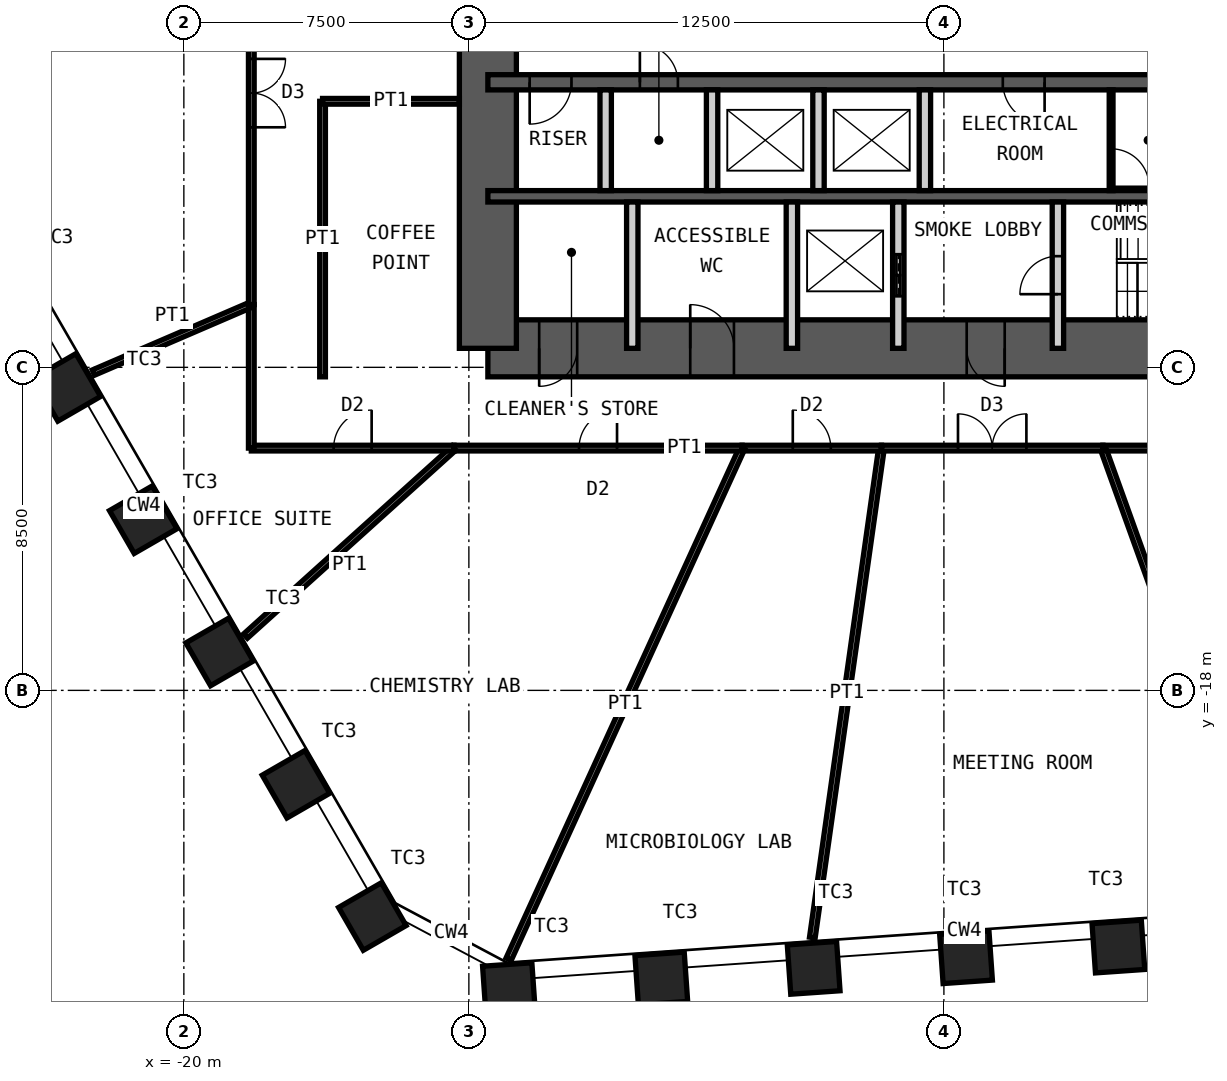
"""IFC4 building model, lengths in metres.
Left out: names, types, materials, properties, quantities, classifications, styles, units other than length and angle.
Written with IfcOpenShell. Run it as: python <this file> out.ifc"""

import sys

from ifc_helpers import new_model, si_unit, direction, frame, frame_2d, origin, origin_2d, place, context, subcontext, project, spatial, rectangle, hollow_rectangle, extrude, element, fill, save


model = new_model("IFC4")
c1 = context("Model", 3, precision=1e-05, world=origin(), true_north=direction((0.0, 1.0)))
c2 = subcontext(c1, "Body", "Model", "MODEL_VIEW")
j1 = project(units=[si_unit("LENGTHUNIT", "METRE"), si_unit("PLANEANGLEUNIT", "RADIAN")], contexts=[c1])
p1 = place(None, origin())
s1 = spatial("IfcSite", under=j1, at=p1, CompositionType="ELEMENT")
p2 = place(p1, origin())
s2 = spatial("IfcBuilding", under=s1, at=p2, CompositionType="ELEMENT")
p3 = place(p2, frame((0.0, 0.0, 128.2)))
s3 = spatial("IfcBuildingStorey", under=s2, at=p3, CompositionType="ELEMENT", Elevation=128.2)
for number, where, z_axis, x_axis in (
    (1, (4.592, -24.74, 0.0), (0.0, 0.0, 1.0), (0.998, 0.07, 0.0)),
    (2, (0.582, -25.02, 0.0), (0.0, 0.0, 1.0), (0.998, 0.07, 0.0)),
    (3, (-3.427, -25.301, 0.0), (0.0, 0.0, 1.0), (0.998, 0.07, 0.0)),
    (4, (-7.436, -25.581, 0.0), (0.0, 0.0, 1.0), (0.998, 0.07, 0.0)),
    (5, (-11.446, -25.861, 0.0), (0.0, 0.0, 1.0), (0.998, 0.07, 0.0)),
    (6, (-15.04, -23.95, 0.0), (0.0, 0.0, 1.0), (0.5, -0.866, 0.0)),
    (7, (-17.049, -20.47, 0.0), (0.0, 0.0, 1.0), (0.5, -0.866, 0.0)),
    (8, (-19.059, -16.989, 0.0), (0.0, 0.0, 1.0), (0.5, -0.866, 0.0)),
    (9, (-21.068, -13.509, 0.0), (0.0, 0.0, 1.0), (0.5, -0.866, 0.0)),
    (10, (-23.078, -10.028, 0.0), (0.0, 0.0, 1.0), (0.5, -0.866, 0.0)),
):
    element("IfcColumn", number, at=place(p3, frame(where, z_axis=z_axis, x_axis=x_axis)), inside=s3, PredefinedType="COLUMN", context=c2, shape_type="SweptSolid", body=[
        extrude(hollow_rectangle(XDim=1.3, YDim=1.3, WallThickness=0.1, at=origin_2d()), origin(), (0.0, 0.0, 1.0), 4.2),
    ])
p4 = place(p3, frame((-12.0, -9.0, 0.0), z_axis=(0.0, 0.0, 1.0), x_axis=(1.0, 0.0, 0.0)))
e11 = element("IfcWall", 11, at=p4, inside=s3, PredefinedType="SHEAR", context=c2, shape_type="SweptSolid", body=[
    extrude(rectangle(XDim=24.0, YDim=1.5, at=frame_2d((12.0, 0.0))), origin(), (0.0, 0.0, 1.0), 4.2),
])
p5 = place(p4, frame((1.35, 0.0, 0.0)))
e12 = element("IfcOpeningElement", 12, at=p5, cuts=e11, PredefinedType="OPENING", context=c2, shape_type="SweptSolid", body=[
    extrude(rectangle(XDim=1.0, YDim=2.1, at=frame_2d((0.5, 1.05))), frame((0.0, 0.76, 0.0), z_axis=(0.0, -1.0, 0.0), x_axis=(1.0, 0.0, 0.0)), (0.0, 0.0, 1.0), 1.52),
])
p6 = place(p4, frame((5.325, 0.0, 0.0)))
e13 = element("IfcOpeningElement", 13, at=p6, cuts=e11, PredefinedType="OPENING", context=c2, shape_type="SweptSolid", body=[
    extrude(rectangle(XDim=1.15, YDim=2.1, at=frame_2d((0.575, 1.05))), frame((0.0, 0.76, 0.0), z_axis=(0.0, -1.0, 0.0), x_axis=(1.0, 0.0, 0.0)), (0.0, 0.0, 1.0), 1.52),
])
p7 = place(p4, frame((12.6, 0.0, 0.0)))
e14 = element("IfcOpeningElement", 14, at=p7, cuts=e11, PredefinedType="OPENING", context=c2, shape_type="SweptSolid", body=[
    extrude(rectangle(XDim=1.0, YDim=2.1, at=frame_2d((0.5, 1.05))), frame((0.0, 0.76, 0.0), z_axis=(0.0, -1.0, 0.0), x_axis=(1.0, 0.0, 0.0)), (0.0, 0.0, 1.0), 1.52),
])
p8 = place(p3, frame((-12.0, -9.0, 0.0), z_axis=(0.0, 0.0, 1.0), x_axis=(0.0, 1.0, 0.0)))
e15 = element("IfcWall", 15, at=p8, inside=s3, PredefinedType="SHEAR", context=c2, shape_type="SweptSolid", body=[
    extrude(rectangle(XDim=18.0, YDim=1.5, at=frame_2d((9.0, 0.0))), origin(), (0.0, 0.0, 1.0), 4.2),
])
p9 = place(p8, frame((8.1, 0.0, 0.0)))
e16 = element("IfcOpeningElement", 16, at=p9, cuts=e15, PredefinedType="OPENING", context=c2, shape_type="SweptSolid", body=[
    extrude(rectangle(XDim=1.8, YDim=2.1, at=frame_2d((0.9, 1.05))), frame((0.0, 0.76, 0.0), z_axis=(0.0, -1.0, 0.0), x_axis=(1.0, 0.0, 0.0)), (0.0, 0.0, 1.0), 1.52),
])
p10 = place(p3, frame((-12.0, -2.0, 0.0), z_axis=(0.0, 0.0, 1.0), x_axis=(1.0, 0.0, 0.0)))
e17 = element("IfcWall", 17, at=p10, inside=s3, PredefinedType="SHEAR", context=c2, shape_type="SweptSolid", body=[
    extrude(rectangle(XDim=24.0, YDim=0.4, at=frame_2d((12.0, 0.0))), origin(), (0.0, 0.0, 1.0), 4.2),
])
p11 = place(p10, frame((1.1, 0.0, 0.0)))
e18 = element("IfcOpeningElement", 18, at=p11, cuts=e17, PredefinedType="OPENING", context=c2, shape_type="SweptSolid", body=[
    extrude(rectangle(XDim=1.1, YDim=2.1, at=frame_2d((0.55, 1.05))), frame((0.0, 0.21, 0.0), z_axis=(0.0, -1.0, 0.0), x_axis=(1.0, 0.0, 0.0)), (0.0, 0.0, 1.0), 0.42),
])
p12 = place(p10, frame((13.55, 0.0, 0.0)))
e19 = element("IfcOpeningElement", 19, at=p12, cuts=e17, PredefinedType="OPENING", context=c2, shape_type="SweptSolid", body=[
    extrude(rectangle(XDim=1.1, YDim=2.1, at=frame_2d((0.55, 1.05))), frame((0.0, 0.21, 0.0), z_axis=(0.0, -1.0, 0.0), x_axis=(1.0, 0.0, 0.0)), (0.0, 0.0, 1.0), 0.42),
])
p13 = place(p10, frame((20.7, 0.0, 0.0)))
e20 = element("IfcOpeningElement", 20, at=p13, cuts=e17, PredefinedType="OPENING", context=c2, shape_type="SweptSolid", body=[
    extrude(rectangle(XDim=1.1, YDim=2.1, at=frame_2d((0.55, 1.05))), frame((0.0, 0.21, 0.0), z_axis=(0.0, -1.0, 0.0), x_axis=(1.0, 0.0, 0.0)), (0.0, 0.0, 1.0), 0.42),
])
p14 = place(p10, frame((4.0, 0.0, 0.0)))
e21 = element("IfcOpeningElement", 21, at=p14, cuts=e17, PredefinedType="OPENING", context=c2, shape_type="SweptSolid", body=[
    extrude(rectangle(XDim=1.0, YDim=2.1, at=frame_2d((0.5, 1.05))), frame((0.0, 0.21, 0.0), z_axis=(0.0, -1.0, 0.0), x_axis=(1.0, 0.0, 0.0)), (0.0, 0.0, 1.0), 0.42),
])
p15 = place(p3, frame((-12.0, -5.0, 0.0), z_axis=(0.0, 0.0, 1.0), x_axis=(1.0, 0.0, 0.0)))
e22 = element("IfcWall", 22, at=p15, inside=s3, PredefinedType="SHEAR", context=c2, shape_type="SweptSolid", body=[
    extrude(rectangle(XDim=24.0, YDim=0.3, at=frame_2d((12.0, 0.0))), origin(), (0.0, 0.0, 1.0), 4.2),
])
for number, where, z_axis, x_axis in (
    (23, (-8.9, -4.85, 0.0), (0.0, 0.0, 1.0), (0.0, 1.0, 0.0)),
    (24, (-6.1, -4.85, 0.0), (0.0, 0.0, 1.0), (0.0, 1.0, 0.0)),
    (25, (-3.3, -4.85, 0.0), (0.0, 0.0, 1.0), (0.0, 1.0, 0.0)),
    (26, (-0.5, -4.85, 0.0), (0.0, 0.0, 1.0), (0.0, 1.0, 0.0)),
):
    element("IfcWall", number, at=place(p3, frame(where, z_axis=z_axis, x_axis=x_axis)), inside=s3, PredefinedType="PARTITIONING", context=c2, shape_type="SweptSolid", body=[
        extrude(rectangle(XDim=2.65, YDim=0.3, at=frame_2d((1.325, 0.0))), origin(), (0.0, 0.0, 1.0), 3.98),
    ])
for number, where, z_axis, x_axis in (
    (27, (-8.2, -9.0, 0.0), (0.0, 0.0, 1.0), (0.0, 1.0, 0.0)),
    (28, (-4.0, -9.0, 0.0), (0.0, 0.0, 1.0), (0.0, 1.0, 0.0)),
):
    element("IfcWall", number, at=place(p3, frame(where, z_axis=z_axis, x_axis=x_axis)), inside=s3, PredefinedType="PARTITIONING", context=c2, shape_type="SweptSolid", body=[
        extrude(rectangle(XDim=3.85, YDim=0.3, at=frame_2d((1.925, 0.0))), origin(), (0.0, 0.0, 1.0), 3.98),
    ])
p16 = place(p3, frame((-1.2, -9.0, 0.0), z_axis=(0.0, 0.0, 1.0), x_axis=(0.0, 1.0, 0.0)))
e29 = element("IfcWall", 29, at=p16, inside=s3, PredefinedType="PARTITIONING", context=c2, shape_type="SweptSolid", body=[
    extrude(rectangle(XDim=3.85, YDim=0.3, at=frame_2d((1.925, 0.0))), origin(), (0.0, 0.0, 1.0), 3.98),
])
p17 = place(p16, frame((1.375, 0.0, 0.0)))
e30 = element("IfcOpeningElement", 30, at=p17, cuts=e29, PredefinedType="OPENING", context=c2, shape_type="SweptSolid", body=[
    extrude(rectangle(XDim=1.1, YDim=2.4, at=frame_2d((0.55, 1.2))), frame((0.0, 0.16, 0.0), z_axis=(0.0, -1.0, 0.0), x_axis=(1.0, 0.0, 0.0)), (0.0, 0.0, 1.0), 0.32),
])
p18 = place(p3, frame((3.0, -9.0, 0.0), z_axis=(0.0, 0.0, 1.0), x_axis=(0.0, 1.0, 0.0)))
e31 = element("IfcWall", 31, at=p18, inside=s3, PredefinedType="PARTITIONING", context=c2, shape_type="SweptSolid", body=[
    extrude(rectangle(XDim=3.85, YDim=0.3, at=frame_2d((1.925, 0.0))), origin(), (0.0, 0.0, 1.0), 3.98),
])
p19 = place(p18, frame((1.425, 0.0, 0.0)))
e32 = element("IfcOpeningElement", 32, at=p19, cuts=e31, PredefinedType="OPENING", context=c2, shape_type="SweptSolid", body=[
    extrude(rectangle(XDim=1.0, YDim=2.1, at=frame_2d((0.5, 1.05))), frame((0.0, 0.16, 0.0), z_axis=(0.0, -1.0, 0.0), x_axis=(1.0, 0.0, 0.0)), (0.0, 0.0, 1.0), 0.32),
])
p20 = place(p3, frame((4.4, -4.85, 0.0), z_axis=(0.0, 0.0, 1.0), x_axis=(0.0, 1.0, 0.0)))
e33 = element("IfcWall", 33, at=p20, inside=s3, PredefinedType="PARTITIONING", context=c2, shape_type="SweptSolid", body=[
    extrude(rectangle(XDim=2.65, YDim=0.1, at=frame_2d((1.325, 0.0))), origin(), (0.0, 0.0, 1.0), 3.98),
])
p21 = place(p20, frame((0.1, 0.0, 0.0)))
e34 = element("IfcOpeningElement", 34, at=p21, cuts=e33, PredefinedType="OPENING", context=c2, shape_type="SweptSolid", body=[
    extrude(rectangle(XDim=1.0, YDim=2.4, at=frame_2d((0.5, 1.2))), frame((0.0, 0.06, 0.0), z_axis=(0.0, -1.0, 0.0), x_axis=(1.0, 0.0, 0.0)), (0.0, 0.0, 1.0), 0.12),
])
p22 = place(p3, frame((-3.462, -24.503, 0.0), z_axis=(0.0, 0.0, 1.0), x_axis=(0.139899618934, 0.990165691499, 0.0)))
e35 = element("IfcWall", 35, at=p22, inside=s3, PredefinedType="PARTITIONING", context=c2, shape_type="SweptSolid", body=[
    extrude(rectangle(XDim=13.006, YDim=0.15, at=frame_2d((6.503, 0.0))), origin(), (0.0, 0.0, 1.0), 3.33),
])
p23 = place(p3, frame((-1.642, -11.625, 0.0), z_axis=(0.0, 0.0, 1.0), x_axis=(-1.0, 0.0, 0.0)))
e36 = element("IfcWall", 36, at=p23, inside=s3, PredefinedType="PARTITIONING", context=c2, shape_type="SweptSolid", body=[
    extrude(rectangle(XDim=3.668, YDim=0.15, at=frame_2d((1.834, 0.0))), origin(), (0.0, 0.0, 1.0), 4.03),
])
p24 = place(p23, frame((1.334, 0.0, 0.0)))
e37 = element("IfcOpeningElement", 37, at=p24, cuts=e36, PredefinedType="OPENING", context=c2, shape_type="SweptSolid", body=[
    extrude(rectangle(XDim=1.0, YDim=2.4, at=frame_2d((0.5, 1.2))), frame((0.0, 0.085, 0.0), z_axis=(0.0, -1.0, 0.0), x_axis=(1.0, 0.0, 0.0)), (0.0, 0.0, 1.0), 0.17),
])
p25 = place(p3, frame((-11.453, -25.072, 0.0), z_axis=(0.0, 0.0, 1.0), x_axis=(0.415494357555, 0.909595755729, 0.0)))
e38 = element("IfcWall", 38, at=p25, inside=s3, PredefinedType="PARTITIONING", context=c2, shape_type="SweptSolid", body=[
    extrude(rectangle(XDim=14.784, YDim=0.15, at=frame_2d((7.392, 0.0))), origin(), (0.0, 0.0, 1.0), 2.93),
])
p26 = place(p3, frame((-5.31, -11.625, 0.0), z_axis=(0.0, 0.0, 1.0), x_axis=(-1.0, 0.0, 0.0)))
e39 = element("IfcWall", 39, at=p26, inside=s3, PredefinedType="PARTITIONING", context=c2, shape_type="SweptSolid", body=[
    extrude(rectangle(XDim=7.582, YDim=0.15, at=frame_2d((3.791, 0.0))), origin(), (0.0, 0.0, 1.0), 4.03),
])
p27 = place(p26, frame((3.291, 0.0, 0.0)))
e40 = element("IfcOpeningElement", 40, at=p27, cuts=e39, PredefinedType="OPENING", context=c2, shape_type="SweptSolid", body=[
    extrude(rectangle(XDim=1.0, YDim=2.4, at=frame_2d((0.5, 1.2))), frame((0.0, 0.085, 0.0), z_axis=(0.0, -1.0, 0.0), x_axis=(1.0, 0.0, 0.0)), (0.0, 0.0, 1.0), 0.17),
])
p28 = place(p3, frame((-18.378, -16.572, 0.0), z_axis=(0.0, 0.0, 1.0), x_axis=(0.742666079924, 0.669661924951, 0.0)))
e41 = element("IfcWall", 41, at=p28, inside=s3, PredefinedType="PARTITIONING", context=c2, shape_type="SweptSolid", body=[
    extrude(rectangle(XDim=7.387, YDim=0.15, at=frame_2d((3.694, 0.0))), origin(), (0.0, 0.0, 1.0), 3.33),
])
p29 = place(p3, frame((-12.892, -11.625, 0.0), z_axis=(0.0, 0.0, 1.0), x_axis=(-1.0, 0.0, 0.0)))
e42 = element("IfcWall", 42, at=p29, inside=s3, PredefinedType="PARTITIONING", context=c2, shape_type="SweptSolid", body=[
    extrude(rectangle(XDim=5.333, YDim=0.15, at=frame_2d((2.667, 0.0))), origin(), (0.0, 0.0, 1.0), 4.03),
])
p30 = place(p29, frame((2.167, 0.0, 0.0)))
e43 = element("IfcOpeningElement", 43, at=p30, cuts=e42, PredefinedType="OPENING", context=c2, shape_type="SweptSolid", body=[
    extrude(rectangle(XDim=1.0, YDim=2.4, at=frame_2d((0.5, 1.2))), frame((0.0, 0.085, 0.0), z_axis=(0.0, -1.0, 0.0), x_axis=(1.0, 0.0, 0.0)), (0.0, 0.0, 1.0), 0.17),
])
p31 = place(p3, frame((-18.225, -11.625, 0.0), z_axis=(0.0, 0.0, 1.0), x_axis=(0.0, 1.0, 0.0)))
e44 = element("IfcWall", 44, at=p31, inside=s3, PredefinedType="PARTITIONING", context=c2, shape_type="SweptSolid", body=[
    extrude(rectangle(XDim=3.776, YDim=0.15, at=frame_2d((1.888, 0.0))), origin(), (0.0, 0.0, 1.0), 4.03),
])
p32 = place(p3, frame((-22.38, -9.638, 0.0), z_axis=(0.0, 0.0, 1.0), x_axis=(0.918428905659, 0.395586078181, 0.0)))
e45 = element("IfcWall", 45, at=p32, inside=s3, PredefinedType="PARTITIONING", context=c2, shape_type="SweptSolid", body=[
    extrude(rectangle(XDim=4.524, YDim=0.15, at=frame_2d((2.262, 0.0))), origin(), (0.0, 0.0, 1.0), 3.33),
])
p33 = place(p3, frame((-18.225, -7.849, 0.0), z_axis=(0.0, 0.0, 1.0), x_axis=(0.0, 1.0, 0.0)))
e46 = element("IfcWall", 46, at=p33, inside=s3, PredefinedType="PARTITIONING", context=c2, shape_type="SweptSolid", body=[
    extrude(rectangle(XDim=11.13, YDim=0.15, at=frame_2d((5.565, 0.0))), origin(), (0.0, 0.0, 1.0), 4.03),
])
p34 = place(p33, frame((4.665, 0.0, 0.0)))
e47 = element("IfcOpeningElement", 47, at=p34, cuts=e46, PredefinedType="OPENING", context=c2, shape_type="SweptSolid", body=[
    extrude(rectangle(XDim=1.8, YDim=2.4, at=frame_2d((0.9, 1.2))), frame((0.0, 0.085, 0.0), z_axis=(0.0, -1.0, 0.0), x_axis=(1.0, 0.0, 0.0)), (0.0, 0.0, 1.0), 0.17),
])
p35 = place(p3, frame((8.401, -11.625, 0.0), z_axis=(0.0, 0.0, 1.0), x_axis=(-1.0, 0.0, 0.0)))
e48 = element("IfcWall", 48, at=p35, inside=s3, PredefinedType="PARTITIONING", context=c2, shape_type="SweptSolid", body=[
    extrude(rectangle(XDim=4.217, YDim=0.15, at=frame_2d((2.109, 0.0))), origin(), (0.0, 0.0, 1.0), 4.03),
])
p36 = place(p35, frame((1.609, 0.0, 0.0)))
e49 = element("IfcOpeningElement", 49, at=p36, cuts=e48, PredefinedType="OPENING", context=c2, shape_type="SweptSolid", body=[
    extrude(rectangle(XDim=1.0, YDim=2.4, at=frame_2d((0.5, 1.2))), frame((0.0, 0.085, 0.0), z_axis=(0.0, -1.0, 0.0), x_axis=(1.0, 0.0, 0.0)), (0.0, 0.0, 1.0), 0.17),
])
p37 = place(p3, frame((8.518, -23.667, 0.0), z_axis=(0.0, 0.0, 1.0), x_axis=(-0.338635030469, 0.940917805198, 0.0)))
e50 = element("IfcWall", 50, at=p37, inside=s3, PredefinedType="PARTITIONING", context=c2, shape_type="SweptSolid", body=[
    extrude(rectangle(XDim=12.798, YDim=0.15, at=frame_2d((6.399, 0.0))), origin(), (0.0, 0.0, 1.0), 3.33),
])
p38 = place(p3, frame((4.184, -11.625, 0.0), z_axis=(0.0, 0.0, 1.0), x_axis=(-1.0, 0.0, 0.0)))
e51 = element("IfcWall", 51, at=p38, inside=s3, PredefinedType="PARTITIONING", context=c2, shape_type="SweptSolid", body=[
    extrude(rectangle(XDim=5.826, YDim=0.15, at=frame_2d((2.913, 0.0))), origin(), (0.0, 0.0, 1.0), 4.03),
])
p39 = place(p38, frame((2.013, 0.0, 0.0)))
e52 = element("IfcOpeningElement", 52, at=p39, cuts=e51, PredefinedType="OPENING", context=c2, shape_type="SweptSolid", body=[
    extrude(rectangle(XDim=1.8, YDim=2.4, at=frame_2d((0.9, 1.2))), frame((0.0, 0.085, 0.0), z_axis=(0.0, -1.0, 0.0), x_axis=(1.0, 0.0, 0.0)), (0.0, 0.0, 1.0), 0.17),
])
p40 = place(p3, frame((-16.35, -9.75, 0.0), z_axis=(0.0, 0.0, 1.0), x_axis=(0.0, 1.0, 0.0)))
e53 = element("IfcWall", 53, at=p40, inside=s3, PredefinedType="PARTITIONING", context=c2, shape_type="SweptSolid", body=[
    extrude(rectangle(XDim=7.25, YDim=0.15, at=frame_2d((3.625, 0.0))), origin(), (0.0, 0.0, 1.0), 4.03),
])
p41 = place(p3, frame((-12.75, -2.5, 0.0), z_axis=(0.0, 0.0, 1.0), x_axis=(-1.0, 0.0, 0.0)))
e54 = element("IfcWall", 54, at=p41, inside=s3, PredefinedType="PARTITIONING", context=c2, shape_type="SweptSolid", body=[
    extrude(rectangle(XDim=3.6, YDim=0.15, at=frame_2d((1.8, 0.0))), origin(), (0.0, 0.0, 1.0), 3.33),
])
p42 = place(p5, origin())
e55 = element("IfcDoor", 55, at=p42, inside=s3, OperationType="SINGLE_SWING_LEFT", PredefinedType="DOOR", context=c2, shape_type="SweptSolid", body=[
    extrude(rectangle(XDim=1.0, YDim=2.1, at=frame_2d((0.5, 1.05))), frame((0.0, 0.025, 0.0), z_axis=(0.0, -1.0, 0.0), x_axis=(1.0, 0.0, 0.0)), (0.0, 0.0, 1.0), 0.05),
])
fill(e12, e55)
p43 = place(p6, origin())
e56 = element("IfcDoor", 56, at=p43, inside=s3, OperationType="SINGLE_SWING_RIGHT", PredefinedType="DOOR", context=c2, shape_type="SweptSolid", body=[
    extrude(rectangle(XDim=1.15, YDim=2.1, at=frame_2d((0.575, 1.05))), frame((0.0, 0.025, 0.0), z_axis=(0.0, -1.0, 0.0), x_axis=(1.0, 0.0, 0.0)), (0.0, 0.0, 1.0), 0.05),
])
fill(e13, e56)
p44 = place(p7, origin())
e57 = element("IfcDoor", 57, at=p44, inside=s3, OperationType="SINGLE_SWING_RIGHT", PredefinedType="DOOR", context=c2, shape_type="SweptSolid", body=[
    extrude(rectangle(XDim=1.0, YDim=2.1, at=frame_2d((0.5, 1.05))), frame((0.0, 0.025, 0.0), z_axis=(0.0, -1.0, 0.0), x_axis=(1.0, 0.0, 0.0)), (0.0, 0.0, 1.0), 0.05),
])
fill(e14, e57)
p45 = place(p19, origin())
e58 = element("IfcDoor", 58, at=p45, inside=s3, OperationType="SINGLE_SWING_RIGHT", PredefinedType="DOOR", context=c2, shape_type="SweptSolid", body=[
    extrude(rectangle(XDim=1.0, YDim=2.1, at=frame_2d((0.5, 1.05))), frame((0.0, 0.025, 0.0), z_axis=(0.0, -1.0, 0.0), x_axis=(1.0, 0.0, 0.0)), (0.0, 0.0, 1.0), 0.05),
])
fill(e32, e58)
p46 = place(p11, origin())
e59 = element("IfcDoor", 59, at=p46, inside=s3, OperationType="SINGLE_SWING_LEFT", PredefinedType="DOOR", context=c2, shape_type="SweptSolid", body=[
    extrude(rectangle(XDim=1.1, YDim=2.1, at=frame_2d((0.55, 1.05))), frame((0.0, 0.025, 0.0), z_axis=(0.0, -1.0, 0.0), x_axis=(1.0, 0.0, 0.0)), (0.0, 0.0, 1.0), 0.05),
])
fill(e18, e59)
p47 = place(p12, origin())
e60 = element("IfcDoor", 60, at=p47, inside=s3, OperationType="SINGLE_SWING_RIGHT", PredefinedType="DOOR", context=c2, shape_type="SweptSolid", body=[
    extrude(rectangle(XDim=1.1, YDim=2.1, at=frame_2d((0.55, 1.05))), frame((0.0, 0.025, 0.0), z_axis=(0.0, -1.0, 0.0), x_axis=(1.0, 0.0, 0.0)), (0.0, 0.0, 1.0), 0.05),
])
fill(e19, e60)
p48 = place(p17, origin())
e61 = element("IfcDoor", 61, at=p48, inside=s3, OperationType="DOUBLE_DOOR_SLIDING", PredefinedType="DOOR", context=c2, shape_type="SweptSolid", body=[
    extrude(rectangle(XDim=1.1, YDim=2.4, at=frame_2d((0.55, 1.2))), frame((0.0, 0.025, 0.0), z_axis=(0.0, -1.0, 0.0), x_axis=(1.0, 0.0, 0.0)), (0.0, 0.0, 1.0), 0.05),
])
fill(e30, e61)
p49 = place(p14, origin())
e62 = element("IfcDoor", 62, at=p49, inside=s3, OperationType="SINGLE_SWING_RIGHT", PredefinedType="DOOR", context=c2, shape_type="SweptSolid", body=[
    extrude(rectangle(XDim=1.0, YDim=2.1, at=frame_2d((0.5, 1.05))), frame((0.0, 0.025, 0.0), z_axis=(0.0, -1.0, 0.0), x_axis=(1.0, 0.0, 0.0)), (0.0, 0.0, 1.0), 0.05),
])
fill(e21, e62)
p50 = place(p21, origin())
e63 = element("IfcDoor", 63, at=p50, inside=s3, OperationType="SINGLE_SWING_LEFT", PredefinedType="DOOR", context=c2, shape_type="SweptSolid", body=[
    extrude(rectangle(XDim=1.0, YDim=2.4, at=frame_2d((0.5, 1.2))), frame((0.0, 0.025, 0.0), z_axis=(0.0, -1.0, 0.0), x_axis=(1.0, 0.0, 0.0)), (0.0, 0.0, 1.0), 0.05),
])
fill(e34, e63)
p51 = place(p24, origin())
e64 = element("IfcDoor", 64, at=p51, inside=s3, OperationType="SINGLE_SWING_RIGHT", PredefinedType="DOOR", context=c2, shape_type="SweptSolid", body=[
    extrude(rectangle(XDim=1.0, YDim=2.4, at=frame_2d((0.5, 1.2))), frame((0.0, 0.025, 0.0), z_axis=(0.0, -1.0, 0.0), x_axis=(1.0, 0.0, 0.0)), (0.0, 0.0, 1.0), 0.05),
])
fill(e37, e64)
p52 = place(p27, origin())
e65 = element("IfcDoor", 65, at=p52, inside=s3, OperationType="SINGLE_SWING_LEFT", PredefinedType="DOOR", context=c2, shape_type="SweptSolid", body=[
    extrude(rectangle(XDim=1.0, YDim=2.4, at=frame_2d((0.5, 1.2))), frame((0.0, 0.025, 0.0), z_axis=(0.0, -1.0, 0.0), x_axis=(1.0, 0.0, 0.0)), (0.0, 0.0, 1.0), 0.05),
])
fill(e40, e65)
p53 = place(p30, origin())
e66 = element("IfcDoor", 66, at=p53, inside=s3, OperationType="SINGLE_SWING_LEFT", PredefinedType="DOOR", context=c2, shape_type="SweptSolid", body=[
    extrude(rectangle(XDim=1.0, YDim=2.4, at=frame_2d((0.5, 1.2))), frame((0.0, 0.025, 0.0), z_axis=(0.0, -1.0, 0.0), x_axis=(1.0, 0.0, 0.0)), (0.0, 0.0, 1.0), 0.05),
])
fill(e43, e66)
p54 = place(p34, origin())
e67 = element("IfcDoor", 67, at=p54, inside=s3, OperationType="DOUBLE_DOOR_DOUBLE_SWING", PredefinedType="DOOR", context=c2, shape_type="SweptSolid", body=[
    extrude(rectangle(XDim=1.8, YDim=2.4, at=frame_2d((0.9, 1.2))), frame((0.0, 0.025, 0.0), z_axis=(0.0, -1.0, 0.0), x_axis=(1.0, 0.0, 0.0)), (0.0, 0.0, 1.0), 0.05),
])
fill(e47, e67)
p55 = place(p39, origin())
e68 = element("IfcDoor", 68, at=p55, inside=s3, OperationType="DOUBLE_DOOR_DOUBLE_SWING", PredefinedType="DOOR", context=c2, shape_type="SweptSolid", body=[
    extrude(rectangle(XDim=1.8, YDim=2.4, at=frame_2d((0.9, 1.2))), frame((0.0, 0.025, 0.0), z_axis=(0.0, -1.0, 0.0), x_axis=(1.0, 0.0, 0.0)), (0.0, 0.0, 1.0), 0.05),
])
fill(e52, e68)
save(model, sys.argv[1])
